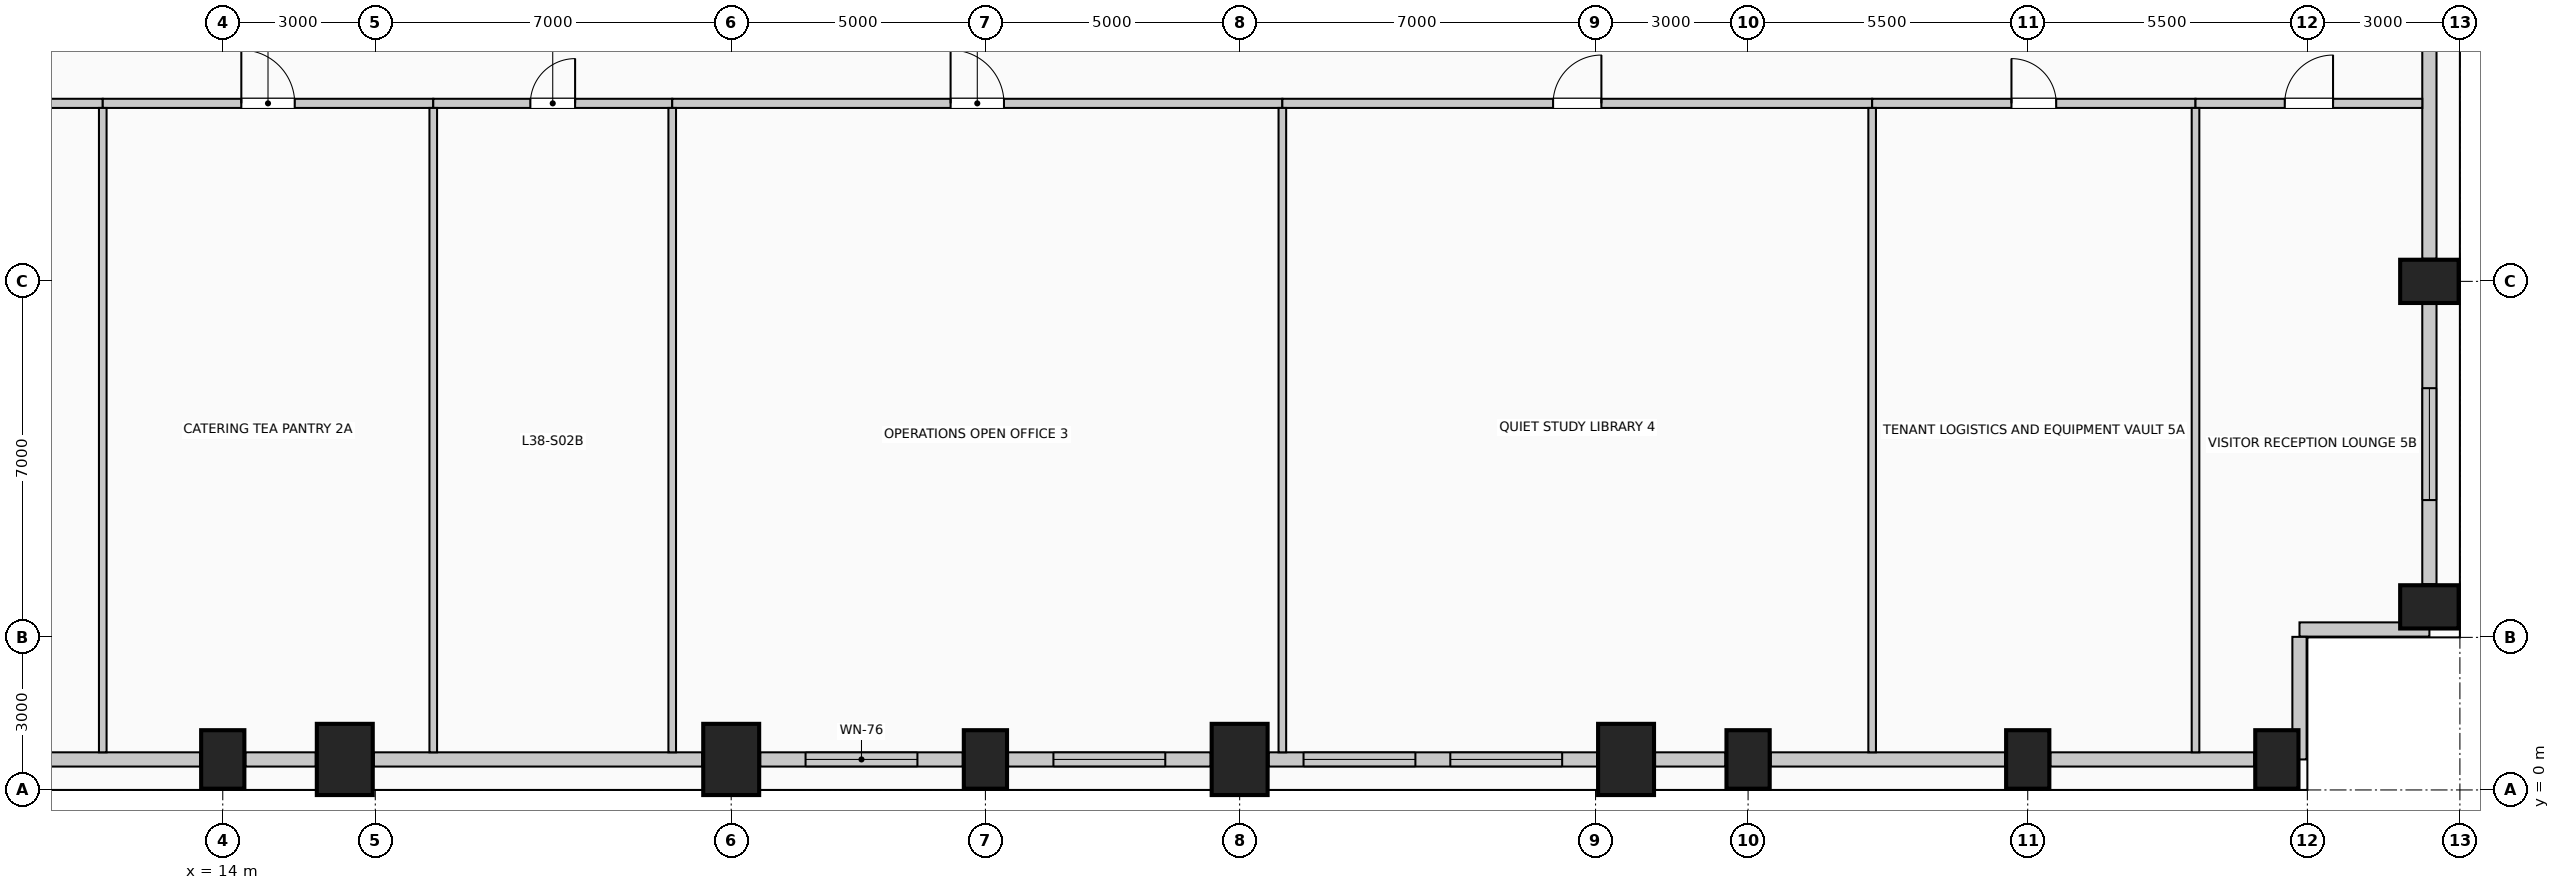
"""IFC4 building model, lengths in metres.
Left out: names, types, materials, properties, quantities, classifications, styles, units other than length and angle.
Written with IfcOpenShell. Run it as: python <this file> out.ifc"""

import sys

from ifc_helpers import new_model, si_unit, direction, frame, frame_2d, origin, origin_2d, place, context, subcontext, project, spatial, rectangle, extrude, element, fill, save


model = new_model("IFC4")
c1 = context("Model", 3, precision=1e-05, world=origin(), true_north=direction((0.0, 1.0)))
c2 = subcontext(c1, "Body", "Model", "MODEL_VIEW")
j1 = project(units=[si_unit("LENGTHUNIT", "METRE"), si_unit("PLANEANGLEUNIT", "RADIAN")], contexts=[c1])
p1 = place(None, origin())
s1 = spatial("IfcSite", under=j1, at=p1, CompositionType="ELEMENT")
p2 = place(p1, origin())
s2 = spatial("IfcBuilding", under=s1, at=p2, CompositionType="ELEMENT")
p3 = place(p2, frame((0.0, 0.0, 156.6)))
s3 = spatial("IfcBuildingStorey", under=s2, at=p3, CompositionType="ELEMENT", Elevation=156.6)
p4 = place(p3, frame((14.0, 0.6, 0.0), z_axis=(0.0, 0.0, 1.0), x_axis=(1.0, 0.0, 0.0)))
e1 = element("IfcColumn", 1, at=p4, inside=s3, PredefinedType="COLUMN", context=c2, shape_type="SweptSolid", body=[
    extrude(rectangle(XDim=0.85, YDim=1.15, at=origin_2d()), origin(), (0.0, 0.0, 1.0), 4.0),
])
for number, where, z_axis, x_axis in (
    (2, (16.4, 0.6, 0.0), (0.0, 0.0, 1.0), (1.0, 0.0, 0.0)),
    (3, (24.0, 0.6, 0.0), (0.0, 0.0, 1.0), (1.0, 0.0, 0.0)),
):
    element("IfcColumn", number, at=place(p3, frame(where, z_axis=z_axis, x_axis=x_axis)), inside=s3, PredefinedType="COLUMN", context=c2, shape_type="SweptSolid", body=[
        extrude(rectangle(XDim=1.1, YDim=1.4, at=origin_2d()), origin(), (0.0, 0.0, 1.0), 4.0),
    ])
p5 = place(p3, frame((29.0, 0.6, 0.0), z_axis=(0.0, 0.0, 1.0), x_axis=(1.0, 0.0, 0.0)))
e4 = element("IfcColumn", 4, at=p5, inside=s3, PredefinedType="COLUMN", context=c2, shape_type="SweptSolid", body=[
    extrude(rectangle(XDim=0.85, YDim=1.15, at=origin_2d()), origin(), (0.0, 0.0, 1.0), 4.0),
])
for number, where, z_axis, x_axis in (
    (5, (34.0, 0.6, 0.0), (0.0, 0.0, 1.0), (1.0, 0.0, 0.0)),
    (6, (41.6, 0.6, 0.0), (0.0, 0.0, 1.0), (1.0, 0.0, 0.0)),
):
    element("IfcColumn", number, at=place(p3, frame(where, z_axis=z_axis, x_axis=x_axis)), inside=s3, PredefinedType="COLUMN", context=c2, shape_type="SweptSolid", body=[
        extrude(rectangle(XDim=1.1, YDim=1.4, at=origin_2d()), origin(), (0.0, 0.0, 1.0), 4.0),
    ])
for number, where, z_axis, x_axis in (
    (7, (44.0, 0.6, 0.0), (0.0, 0.0, 1.0), (1.0, 0.0, 0.0)),
    (8, (49.5, 0.6, 0.0), (0.0, 0.0, 1.0), (1.0, 0.0, 0.0)),
    (9, (54.4, 0.6, 0.0), (0.0, 0.0, 1.0), (1.0, 0.0, 0.0)),
    (10, (57.4, 3.6, 0.0), (0.0, 0.0, 1.0), (0.0, 1.0, 0.0)),
    (11, (57.4, 10.0, 0.0), (0.0, 0.0, 1.0), (0.0, 1.0, 0.0)),
):
    element("IfcColumn", number, at=place(p3, frame(where, z_axis=z_axis, x_axis=x_axis)), inside=s3, PredefinedType="COLUMN", context=c2, shape_type="SweptSolid", body=[
        extrude(rectangle(XDim=0.85, YDim=1.15, at=origin_2d()), origin(), (0.0, 0.0, 1.0), 4.0),
    ])
p6 = place(p3, frame((13.555, 0.6, 0.0), z_axis=(0.0, 0.0, 1.0), x_axis=(-1.0, 0.0, 0.0)))
e12 = element("IfcWall", 12, at=p6, inside=s3, PredefinedType="SOLIDWALL", context=c2, shape_type="SweptSolid", body=[
    extrude(rectangle(XDim=4.61, YDim=0.28, at=frame_2d((2.305, 0.0))), origin(), (0.0, 0.0, 1.0), 2.81),
])
p7 = place(p3, frame((15.83, 0.6, 0.0), z_axis=(0.0, 0.0, 1.0), x_axis=(-1.0, 0.0, 0.0)))
e13 = element("IfcWall", 13, at=p7, inside=s3, PredefinedType="SOLIDWALL", context=c2, shape_type="SweptSolid", body=[
    extrude(rectangle(XDim=1.385, YDim=0.28, at=frame_2d((0.692, 0.0))), origin(), (0.0, 0.0, 1.0), 2.81),
])
p8 = place(p3, frame((23.43, 0.6, 0.0), z_axis=(0.0, 0.0, 1.0), x_axis=(-1.0, 0.0, 0.0)))
e14 = element("IfcWall", 14, at=p8, inside=s3, PredefinedType="SOLIDWALL", context=c2, shape_type="SweptSolid", body=[
    extrude(rectangle(XDim=6.46, YDim=0.28, at=frame_2d((3.23, 0.0))), origin(), (0.0, 0.0, 1.0), 2.81),
])
p9 = place(p3, frame((28.555, 0.6, 0.0), z_axis=(0.0, 0.0, 1.0), x_axis=(-1.0, 0.0, 0.0)))
e15 = element("IfcWall", 15, at=p9, inside=s3, PredefinedType="SOLIDWALL", context=c2, shape_type="SweptSolid", body=[
    extrude(rectangle(XDim=3.985, YDim=0.28, at=frame_2d((1.992, 0.0))), origin(), (0.0, 0.0, 1.0), 2.81),
])
p10 = place(p9, frame((0.893, 0.0, 0.5)))
e16 = element("IfcOpeningElement", 16, at=p10, cuts=e15, PredefinedType="OPENING", context=c2, shape_type="SweptSolid", body=[
    extrude(rectangle(XDim=2.2, YDim=1.95, at=frame_2d((1.1, 0.975))), frame((0.0, 0.15, 0.0), z_axis=(0.0, -1.0, 0.0), x_axis=(1.0, 0.0, 0.0)), (0.0, 0.0, 1.0), 0.3),
])
p11 = place(p3, frame((33.43, 0.6, 0.0), z_axis=(0.0, 0.0, 1.0), x_axis=(-1.0, 0.0, 0.0)))
e17 = element("IfcWall", 17, at=p11, inside=s3, PredefinedType="SOLIDWALL", context=c2, shape_type="SweptSolid", body=[
    extrude(rectangle(XDim=3.985, YDim=0.28, at=frame_2d((1.992, 0.0))), origin(), (0.0, 0.0, 1.0), 2.81),
])
p12 = place(p11, frame((0.893, 0.0, 0.5)))
e18 = element("IfcOpeningElement", 18, at=p12, cuts=e17, PredefinedType="OPENING", context=c2, shape_type="SweptSolid", body=[
    extrude(rectangle(XDim=2.2, YDim=1.95, at=frame_2d((1.1, 0.975))), frame((0.0, 0.15, 0.0), z_axis=(0.0, -1.0, 0.0), x_axis=(1.0, 0.0, 0.0)), (0.0, 0.0, 1.0), 0.3),
])
p13 = place(p3, frame((41.03, 0.6, 0.0), z_axis=(0.0, 0.0, 1.0), x_axis=(-1.0, 0.0, 0.0)))
e19 = element("IfcWall", 19, at=p13, inside=s3, PredefinedType="SOLIDWALL", context=c2, shape_type="SweptSolid", body=[
    extrude(rectangle(XDim=6.46, YDim=0.28, at=frame_2d((3.23, 0.0))), origin(), (0.0, 0.0, 1.0), 2.81),
])
p14 = place(p13, frame((0.687, 0.0, 0.5)))
e20 = element("IfcOpeningElement", 20, at=p14, cuts=e19, PredefinedType="OPENING", context=c2, shape_type="SweptSolid", body=[
    extrude(rectangle(XDim=2.2, YDim=1.95, at=frame_2d((1.1, 0.975))), frame((0.0, 0.15, 0.0), z_axis=(0.0, -1.0, 0.0), x_axis=(1.0, 0.0, 0.0)), (0.0, 0.0, 1.0), 0.3),
])
p15 = place(p13, frame((3.573, 0.0, 0.5)))
e21 = element("IfcOpeningElement", 21, at=p15, cuts=e19, PredefinedType="OPENING", context=c2, shape_type="SweptSolid", body=[
    extrude(rectangle(XDim=2.2, YDim=1.95, at=frame_2d((1.1, 0.975))), frame((0.0, 0.15, 0.0), z_axis=(0.0, -1.0, 0.0), x_axis=(1.0, 0.0, 0.0)), (0.0, 0.0, 1.0), 0.3),
])
p16 = place(p3, frame((43.555, 0.6, 0.0), z_axis=(0.0, 0.0, 1.0), x_axis=(-1.0, 0.0, 0.0)))
e22 = element("IfcWall", 22, at=p16, inside=s3, PredefinedType="SOLIDWALL", context=c2, shape_type="SweptSolid", body=[
    extrude(rectangle(XDim=1.385, YDim=0.28, at=frame_2d((0.692, 0.0))), origin(), (0.0, 0.0, 1.0), 2.81),
])
p17 = place(p3, frame((49.055, 0.6, 0.0), z_axis=(0.0, 0.0, 1.0), x_axis=(-1.0, 0.0, 0.0)))
e23 = element("IfcWall", 23, at=p17, inside=s3, PredefinedType="SOLIDWALL", context=c2, shape_type="SweptSolid", body=[
    extrude(rectangle(XDim=4.61, YDim=0.28, at=frame_2d((2.305, 0.0))), origin(), (0.0, 0.0, 1.0), 2.81),
])
p18 = place(p3, frame((53.955, 0.6, 0.0), z_axis=(0.0, 0.0, 1.0), x_axis=(-1.0, 0.0, 0.0)))
e24 = element("IfcWall", 24, at=p18, inside=s3, PredefinedType="SOLIDWALL", context=c2, shape_type="SweptSolid", body=[
    extrude(rectangle(XDim=4.01, YDim=0.28, at=frame_2d((2.005, 0.0))), origin(), (0.0, 0.0, 1.0), 2.81),
])
p19 = place(p3, frame((57.4, 9.555, 0.0), z_axis=(0.0, 0.0, 1.0), x_axis=(0.0, -1.0, 0.0)))
e25 = element("IfcWall", 25, at=p19, inside=s3, PredefinedType="SOLIDWALL", context=c2, shape_type="SweptSolid", body=[
    extrude(rectangle(XDim=5.51, YDim=0.28, at=frame_2d((2.755, 0.0))), origin(), (0.0, 0.0, 1.0), 2.81),
])
p20 = place(p19, frame((1.655, 0.0, 0.5)))
e26 = element("IfcOpeningElement", 26, at=p20, cuts=e25, PredefinedType="OPENING", context=c2, shape_type="SweptSolid", body=[
    extrude(rectangle(XDim=2.2, YDim=1.95, at=frame_2d((1.1, 0.975))), frame((0.0, 0.15, 0.0), z_axis=(0.0, -1.0, 0.0), x_axis=(1.0, 0.0, 0.0)), (0.0, 0.0, 1.0), 0.3),
])
p21 = place(p3, frame((57.4, 17.555, 0.0), z_axis=(0.0, 0.0, 1.0), x_axis=(0.0, -1.0, 0.0)))
e27 = element("IfcWall", 27, at=p21, inside=s3, PredefinedType="SOLIDWALL", context=c2, shape_type="SweptSolid", body=[
    extrude(rectangle(XDim=7.11, YDim=0.28, at=frame_2d((3.555, 0.0))), origin(), (0.0, 0.0, 1.0), 2.81),
])
p22 = place(p3, frame((57.4, 3.155, 0.0), z_axis=(0.0, 0.0, 1.0), x_axis=(-1.0, 0.0, 0.0)))
e28 = element("IfcWall", 28, at=p22, inside=s3, PredefinedType="SOLIDWALL", context=c2, shape_type="SweptSolid", body=[
    extrude(rectangle(XDim=2.555, YDim=0.28, at=frame_2d((1.277, 0.0))), origin(), (0.0, 0.0, 1.0), 3.66),
])
p23 = place(p3, frame((54.845, 3.01, 0.0), z_axis=(0.0, 0.0, 1.0), x_axis=(0.0, -1.0, 0.0)))
e29 = element("IfcWall", 29, at=p23, inside=s3, PredefinedType="SOLIDWALL", context=c2, shape_type="SweptSolid", body=[
    extrude(rectangle(XDim=2.41, YDim=0.28, at=frame_2d((1.205, 0.0))), origin(), (0.0, 0.0, 1.0), 3.66),
])
p24 = place(p3, frame((0.74, 13.5, 0.0), z_axis=(0.0, 0.0, 1.0), x_axis=(1.0, 0.0, 0.0)))
e30 = element("IfcWall", 30, at=p24, inside=s3, PredefinedType="PARTITIONING", context=c2, shape_type="SweptSolid", body=[
    extrude(rectangle(XDim=10.9, YDim=0.18, at=frame_2d((5.45, 0.0))), origin(), (0.0, 0.0, 1.0), 3.66),
])
p25 = place(p24, frame((4.975, 0.0, 0.0)))
e31 = element("IfcOpeningElement", 31, at=p25, cuts=e30, PredefinedType="OPENING", context=c2, shape_type="SweptSolid", body=[
    extrude(rectangle(XDim=0.95, YDim=2.15, at=frame_2d((0.475, 1.075))), frame((0.0, 0.1, 0.0), z_axis=(0.0, -1.0, 0.0), x_axis=(1.0, 0.0, 0.0)), (0.0, 0.0, 1.0), 0.2),
])
p26 = place(p3, frame((11.64, 13.5, 0.0), z_axis=(0.0, 0.0, 1.0), x_axis=(1.0, 0.0, 0.0)))
e32 = element("IfcWall", 32, at=p26, inside=s3, PredefinedType="PARTITIONING", context=c2, shape_type="SweptSolid", body=[
    extrude(rectangle(XDim=6.5, YDim=0.18, at=frame_2d((3.25, 0.0))), origin(), (0.0, 0.0, 1.0), 3.66),
])
p27 = place(p26, frame((2.725, 0.0, 0.0)))
e33 = element("IfcOpeningElement", 33, at=p27, cuts=e32, PredefinedType="OPENING", context=c2, shape_type="SweptSolid", body=[
    extrude(rectangle(XDim=1.05, YDim=2.15, at=frame_2d((0.525, 1.075))), frame((0.0, 0.1, 0.0), z_axis=(0.0, -1.0, 0.0), x_axis=(1.0, 0.0, 0.0)), (0.0, 0.0, 1.0), 0.2),
])
p28 = place(p3, frame((18.14, 13.5, 0.0), z_axis=(0.0, 0.0, 1.0), x_axis=(1.0, 0.0, 0.0)))
e34 = element("IfcWall", 34, at=p28, inside=s3, PredefinedType="PARTITIONING", context=c2, shape_type="SweptSolid", body=[
    extrude(rectangle(XDim=4.7, YDim=0.18, at=frame_2d((2.35, 0.0))), origin(), (0.0, 0.0, 1.0), 3.66),
])
p29 = place(p28, frame((1.91, 0.0, 0.0)))
e35 = element("IfcOpeningElement", 35, at=p29, cuts=e34, PredefinedType="OPENING", context=c2, shape_type="SweptSolid", body=[
    extrude(rectangle(XDim=0.88, YDim=2.1, at=frame_2d((0.44, 1.05))), frame((0.0, 0.1, 0.0), z_axis=(0.0, -1.0, 0.0), x_axis=(1.0, 0.0, 0.0)), (0.0, 0.0, 1.0), 0.2),
])
p30 = place(p3, frame((22.84, 13.5, 0.0), z_axis=(0.0, 0.0, 1.0), x_axis=(1.0, 0.0, 0.0)))
e36 = element("IfcWall", 36, at=p30, inside=s3, PredefinedType="PARTITIONING", context=c2, shape_type="SweptSolid", body=[
    extrude(rectangle(XDim=12.0, YDim=0.18, at=frame_2d((6.0, 0.0))), origin(), (0.0, 0.0, 1.0), 3.66),
])
p31 = place(p30, frame((5.475, 0.0, 0.0)))
e37 = element("IfcOpeningElement", 37, at=p31, cuts=e36, PredefinedType="OPENING", context=c2, shape_type="SweptSolid", body=[
    extrude(rectangle(XDim=1.05, YDim=2.15, at=frame_2d((0.525, 1.075))), frame((0.0, 0.1, 0.0), z_axis=(0.0, -1.0, 0.0), x_axis=(1.0, 0.0, 0.0)), (0.0, 0.0, 1.0), 0.2),
])
p32 = place(p3, frame((34.84, 13.5, 0.0), z_axis=(0.0, 0.0, 1.0), x_axis=(1.0, 0.0, 0.0)))
e38 = element("IfcWall", 38, at=p32, inside=s3, PredefinedType="PARTITIONING", context=c2, shape_type="SweptSolid", body=[
    extrude(rectangle(XDim=11.6, YDim=0.18, at=frame_2d((5.8, 0.0))), origin(), (0.0, 0.0, 1.0), 3.66),
])
p33 = place(p32, frame((5.325, 0.0, 0.0)))
e39 = element("IfcOpeningElement", 39, at=p33, cuts=e38, PredefinedType="OPENING", context=c2, shape_type="SweptSolid", body=[
    extrude(rectangle(XDim=0.95, YDim=2.15, at=frame_2d((0.475, 1.075))), frame((0.0, 0.1, 0.0), z_axis=(0.0, -1.0, 0.0), x_axis=(1.0, 0.0, 0.0)), (0.0, 0.0, 1.0), 0.2),
])
p34 = place(p3, frame((46.44, 13.5, 0.0), z_axis=(0.0, 0.0, 1.0), x_axis=(1.0, 0.0, 0.0)))
e40 = element("IfcWall", 40, at=p34, inside=s3, PredefinedType="PARTITIONING", context=c2, shape_type="SweptSolid", body=[
    extrude(rectangle(XDim=6.36, YDim=0.18, at=frame_2d((3.18, 0.0))), origin(), (0.0, 0.0, 1.0), 3.66),
])
p35 = place(p34, frame((2.74, 0.0, 0.0)))
e41 = element("IfcOpeningElement", 41, at=p35, cuts=e40, PredefinedType="OPENING", context=c2, shape_type="SweptSolid", body=[
    extrude(rectangle(XDim=0.88, YDim=2.1, at=frame_2d((0.44, 1.05))), frame((0.0, 0.1, 0.0), z_axis=(0.0, -1.0, 0.0), x_axis=(1.0, 0.0, 0.0)), (0.0, 0.0, 1.0), 0.2),
])
p36 = place(p3, frame((52.8, 13.5, 0.0), z_axis=(0.0, 0.0, 1.0), x_axis=(1.0, 0.0, 0.0)))
e42 = element("IfcWall", 42, at=p36, inside=s3, PredefinedType="PARTITIONING", context=c2, shape_type="SweptSolid", body=[
    extrude(rectangle(XDim=4.46, YDim=0.18, at=frame_2d((2.23, 0.0))), origin(), (0.0, 0.0, 1.0), 3.66),
])
p37 = place(p36, frame((1.755, 0.0, 0.0)))
e43 = element("IfcOpeningElement", 43, at=p37, cuts=e42, PredefinedType="OPENING", context=c2, shape_type="SweptSolid", body=[
    extrude(rectangle(XDim=0.95, YDim=2.15, at=frame_2d((0.475, 1.075))), frame((0.0, 0.1, 0.0), z_axis=(0.0, -1.0, 0.0), x_axis=(1.0, 0.0, 0.0)), (0.0, 0.0, 1.0), 0.2),
])
for number, where, z_axis, x_axis in (
    (44, (11.64, 0.74, 0.0), (0.0, 0.0, 1.0), (0.0, 1.0, 0.0)),
    (45, (18.14, 0.74, 0.0), (0.0, 0.0, 1.0), (0.0, 1.0, 0.0)),
    (46, (22.84, 0.74, 0.0), (0.0, 0.0, 1.0), (0.0, 1.0, 0.0)),
    (47, (34.84, 0.74, 0.0), (0.0, 0.0, 1.0), (0.0, 1.0, 0.0)),
    (48, (46.44, 0.74, 0.0), (0.0, 0.0, 1.0), (0.0, 1.0, 0.0)),
    (49, (52.8, 0.74, 0.0), (0.0, 0.0, 1.0), (0.0, 1.0, 0.0)),
):
    element("IfcWall", number, at=place(p3, frame(where, z_axis=z_axis, x_axis=x_axis)), inside=s3, PredefinedType="PARTITIONING", context=c2, shape_type="SweptSolid", body=[
        extrude(rectangle(XDim=12.67, YDim=0.15, at=frame_2d((6.335, 0.0))), origin(), (0.0, 0.0, 1.0), 3.66),
    ])
p38 = place(p10, origin())
e50 = element("IfcWindow", 50, at=p38, inside=s3, PartitioningType="SINGLE_PANEL", PredefinedType="WINDOW", context=c2, shape_type="SweptSolid", body=[
    extrude(rectangle(XDim=2.2, YDim=1.95, at=frame_2d((1.1, 0.975))), frame((0.0, 0.03, 0.0), z_axis=(0.0, -1.0, 0.0), x_axis=(1.0, 0.0, 0.0)), (0.0, 0.0, 1.0), 0.06),
])
fill(e16, e50)
p39 = place(p12, origin())
e51 = element("IfcWindow", 51, at=p39, inside=s3, PartitioningType="SINGLE_PANEL", PredefinedType="WINDOW", context=c2, shape_type="SweptSolid", body=[
    extrude(rectangle(XDim=2.2, YDim=1.95, at=frame_2d((1.1, 0.975))), frame((0.0, 0.03, 0.0), z_axis=(0.0, -1.0, 0.0), x_axis=(1.0, 0.0, 0.0)), (0.0, 0.0, 1.0), 0.06),
])
fill(e18, e51)
p40 = place(p14, origin())
e52 = element("IfcWindow", 52, at=p40, inside=s3, PartitioningType="SINGLE_PANEL", PredefinedType="WINDOW", context=c2, shape_type="SweptSolid", body=[
    extrude(rectangle(XDim=2.2, YDim=1.95, at=frame_2d((1.1, 0.975))), frame((0.0, 0.03, 0.0), z_axis=(0.0, -1.0, 0.0), x_axis=(1.0, 0.0, 0.0)), (0.0, 0.0, 1.0), 0.06),
])
fill(e20, e52)
p41 = place(p15, origin())
e53 = element("IfcWindow", 53, at=p41, inside=s3, PartitioningType="SINGLE_PANEL", PredefinedType="WINDOW", context=c2, shape_type="SweptSolid", body=[
    extrude(rectangle(XDim=2.2, YDim=1.95, at=frame_2d((1.1, 0.975))), frame((0.0, 0.03, 0.0), z_axis=(0.0, -1.0, 0.0), x_axis=(1.0, 0.0, 0.0)), (0.0, 0.0, 1.0), 0.06),
])
fill(e21, e53)
p42 = place(p20, origin())
e54 = element("IfcWindow", 54, at=p42, inside=s3, PartitioningType="SINGLE_PANEL", PredefinedType="WINDOW", context=c2, shape_type="SweptSolid", body=[
    extrude(rectangle(XDim=2.2, YDim=1.95, at=frame_2d((1.1, 0.975))), frame((0.0, 0.03, 0.0), z_axis=(0.0, -1.0, 0.0), x_axis=(1.0, 0.0, 0.0)), (0.0, 0.0, 1.0), 0.06),
])
fill(e26, e54)
p43 = place(p27, origin())
e55 = element("IfcDoor", 55, at=p43, inside=s3, OperationType="SINGLE_SWING_LEFT", PredefinedType="DOOR", context=c2, shape_type="SweptSolid", body=[
    extrude(rectangle(XDim=1.05, YDim=2.15, at=frame_2d((0.525, 1.075))), frame((0.0, 0.025, 0.0), z_axis=(0.0, -1.0, 0.0), x_axis=(1.0, 0.0, 0.0)), (0.0, 0.0, 1.0), 0.05),
])
fill(e33, e55)
p44 = place(p29, origin())
e56 = element("IfcDoor", 56, at=p44, inside=s3, OperationType="SINGLE_SWING_RIGHT", PredefinedType="DOOR", context=c2, shape_type="SweptSolid", body=[
    extrude(rectangle(XDim=0.88, YDim=2.1, at=frame_2d((0.44, 1.05))), frame((0.0, 0.025, 0.0), z_axis=(0.0, -1.0, 0.0), x_axis=(1.0, 0.0, 0.0)), (0.0, 0.0, 1.0), 0.05),
])
fill(e35, e56)
p45 = place(p31, origin())
e57 = element("IfcDoor", 57, at=p45, inside=s3, OperationType="SINGLE_SWING_LEFT", PredefinedType="DOOR", context=c2, shape_type="SweptSolid", body=[
    extrude(rectangle(XDim=1.05, YDim=2.15, at=frame_2d((0.525, 1.075))), frame((0.0, 0.025, 0.0), z_axis=(0.0, -1.0, 0.0), x_axis=(1.0, 0.0, 0.0)), (0.0, 0.0, 1.0), 0.05),
])
fill(e37, e57)
p46 = place(p33, origin())
e58 = element("IfcDoor", 58, at=p46, inside=s3, OperationType="SINGLE_SWING_RIGHT", PredefinedType="DOOR", context=c2, shape_type="SweptSolid", body=[
    extrude(rectangle(XDim=0.95, YDim=2.15, at=frame_2d((0.475, 1.075))), frame((0.0, 0.025, 0.0), z_axis=(0.0, -1.0, 0.0), x_axis=(1.0, 0.0, 0.0)), (0.0, 0.0, 1.0), 0.05),
])
fill(e39, e58)
p47 = place(p35, origin())
e59 = element("IfcDoor", 59, at=p47, inside=s3, OperationType="SINGLE_SWING_LEFT", PredefinedType="DOOR", context=c2, shape_type="SweptSolid", body=[
    extrude(rectangle(XDim=0.88, YDim=2.1, at=frame_2d((0.44, 1.05))), frame((0.0, 0.025, 0.0), z_axis=(0.0, -1.0, 0.0), x_axis=(1.0, 0.0, 0.0)), (0.0, 0.0, 1.0), 0.05),
])
fill(e41, e59)
p48 = place(p37, origin())
e60 = element("IfcDoor", 60, at=p48, inside=s3, OperationType="SINGLE_SWING_RIGHT", PredefinedType="DOOR", context=c2, shape_type="SweptSolid", body=[
    extrude(rectangle(XDim=0.95, YDim=2.15, at=frame_2d((0.475, 1.075))), frame((0.0, 0.025, 0.0), z_axis=(0.0, -1.0, 0.0), x_axis=(1.0, 0.0, 0.0)), (0.0, 0.0, 1.0), 0.05),
])
fill(e43, e60)
save(model, sys.argv[1])
